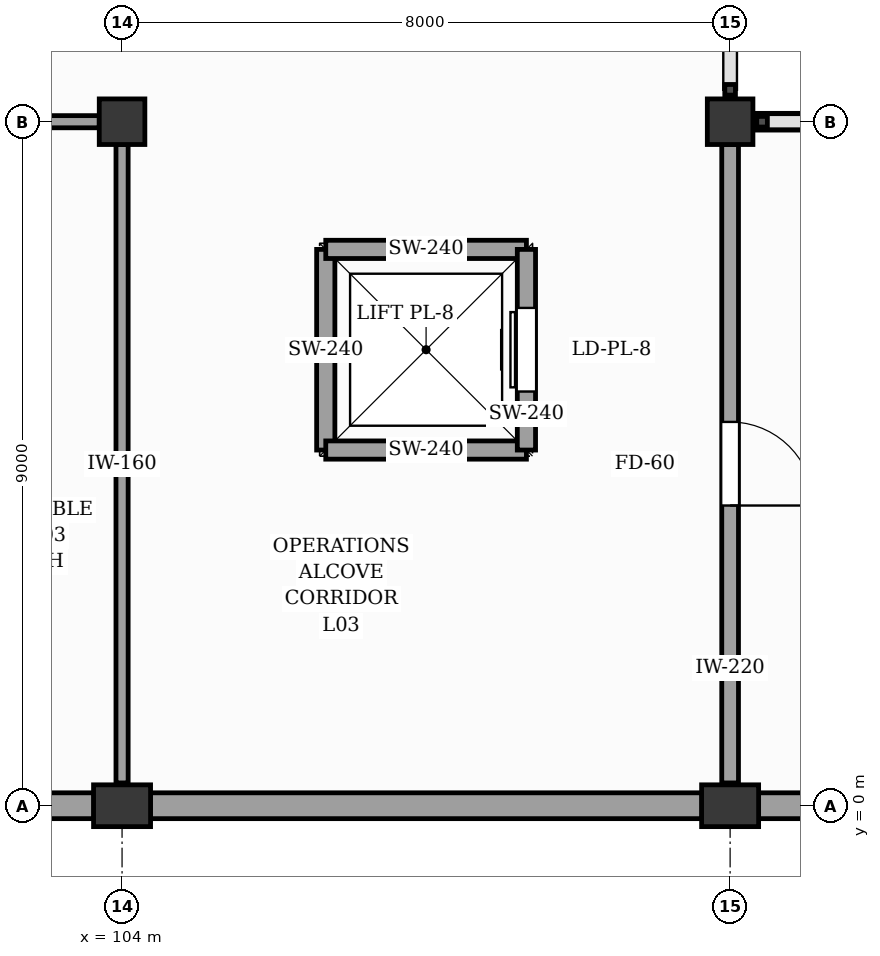
"""IFC4 building model, lengths in metres.
Left out: names, types, materials, properties, quantities, classifications, styles, units other than length and angle.
Written with IfcOpenShell. Run it as: python <this file> out.ifc"""

import sys

from ifc_helpers import new_model, si_unit, direction, frame, frame_2d, origin, origin_2d, place, context, subcontext, project, spatial, rectangle, extrude, element, fill, save


model = new_model("IFC4")
c1 = context("Model", 3, precision=1e-05, world=origin(), true_north=direction((0.0, 1.0)))
c2 = subcontext(c1, "Body", "Model", "MODEL_VIEW")
j1 = project(units=[si_unit("LENGTHUNIT", "METRE"), si_unit("PLANEANGLEUNIT", "RADIAN")], contexts=[c1])
p1 = place(None, origin())
s1 = spatial("IfcSite", under=j1, at=p1, CompositionType="ELEMENT")
p2 = place(p1, origin())
s2 = spatial("IfcBuilding", under=s1, at=p2, CompositionType="ELEMENT")
p3 = place(p2, frame((0.0, 0.0, 16.2)))
s3 = spatial("IfcBuildingStorey", under=s2, at=p3, CompositionType="ELEMENT", Elevation=16.2)
p4 = place(p3, frame((104.0, 0.0, 0.0), z_axis=(0.0, 0.0, 1.0), x_axis=(1.0, 0.0, 0.0)))
e1 = element("IfcColumn", 1, at=p4, inside=s3, PredefinedType="PILASTER", context=c2, shape_type="SweptSolid", body=[
    extrude(rectangle(XDim=0.75, YDim=0.55, at=origin_2d()), origin(), (0.0, 0.0, 1.0), 4.2),
])
p5 = place(p3, frame((104.0, 9.0, 0.0), z_axis=(0.0, 0.0, 1.0), x_axis=(1.0, 0.0, 0.0)))
e2 = element("IfcColumn", 2, at=p5, inside=s3, PredefinedType="COLUMN", context=c2, shape_type="SweptSolid", body=[
    extrude(rectangle(XDim=0.6, YDim=0.6, at=origin_2d()), origin(), (0.0, 0.0, 1.0), 4.2),
])
p6 = place(p3, frame((112.0, 0.0, 0.0), z_axis=(0.0, 0.0, 1.0), x_axis=(1.0, 0.0, 0.0)))
e3 = element("IfcColumn", 3, at=p6, inside=s3, PredefinedType="PILASTER", context=c2, shape_type="SweptSolid", body=[
    extrude(rectangle(XDim=0.75, YDim=0.55, at=origin_2d()), origin(), (0.0, 0.0, 1.0), 4.2),
])
p7 = place(p3, frame((112.0, 9.0, 0.0), z_axis=(0.0, 0.0, 1.0), x_axis=(1.0, 0.0, 0.0)))
e4 = element("IfcColumn", 4, at=p7, inside=s3, PredefinedType="COLUMN", context=c2, shape_type="SweptSolid", body=[
    extrude(rectangle(XDim=0.6, YDim=0.6, at=origin_2d()), origin(), (0.0, 0.0, 1.0), 4.2),
])
for number, where, z_axis, x_axis in (
    (5, (96.37, 0.0, 0.0), (0.0, 0.0, 1.0), (1.0, 0.0, 0.0)),
    (6, (104.37, 0.0, 0.0), (0.0, 0.0, 1.0), (1.0, 0.0, 0.0)),
):
    element("IfcWall", number, at=place(p3, frame(where, z_axis=z_axis, x_axis=x_axis)), inside=s3, PredefinedType="SOLIDWALL", context=c2, shape_type="SweptSolid", body=[
        extrude(rectangle(XDim=7.26, YDim=0.34, at=frame_2d((3.63, 0.0))), origin(), (0.0, 0.0, 1.0), 3.24),
    ])
p8 = place(p3, frame((112.37, 0.0, 0.0), z_axis=(0.0, 0.0, 1.0), x_axis=(1.0, 0.0, 0.0)))
e7 = element("IfcWall", 7, at=p8, inside=s3, PredefinedType="SOLIDWALL", context=c2, shape_type="SweptSolid", body=[
    extrude(rectangle(XDim=7.26, YDim=0.34, at=frame_2d((3.63, 0.0))), origin(), (0.0, 0.0, 1.0), 2.75),
])
for number, where, z_axis, x_axis in (
    (8, (106.68, 4.68, 0.0), (0.0, 0.0, 1.0), (0.0, 1.0, 0.0)),
    (9, (106.68, 4.68, 0.0), (0.0, 0.0, 1.0), (1.0, 0.0, 0.0)),
    (10, (106.68, 7.32, 0.0), (0.0, 0.0, 1.0), (1.0, 0.0, 0.0)),
):
    element("IfcWall", number, at=place(p3, frame(where, z_axis=z_axis, x_axis=x_axis)), inside=s3, PredefinedType="SHEAR", context=c2, shape_type="SweptSolid", body=[
        extrude(rectangle(XDim=2.64, YDim=0.24, at=frame_2d((1.32, 0.0))), origin(), (0.0, 0.0, 1.0), 3.92),
    ])
p9 = place(p3, frame((109.32, 4.68, 0.0), z_axis=(0.0, 0.0, 1.0), x_axis=(0.0, 1.0, 0.0)))
e11 = element("IfcWall", 11, at=p9, inside=s3, PredefinedType="SHEAR", context=c2, shape_type="SweptSolid", body=[
    extrude(rectangle(XDim=2.64, YDim=0.24, at=frame_2d((1.32, 0.0))), origin(), (0.0, 0.0, 1.0), 3.92),
])
p10 = place(p9, frame((0.77, 0.0, 0.0)))
e12 = element("IfcOpeningElement", 12, at=p10, cuts=e11, PredefinedType="OPENING", context=c2, shape_type="SweptSolid", body=[
    extrude(rectangle(XDim=1.1, YDim=2.15, at=frame_2d((0.55, 1.075))), frame((0.0, 0.13, 0.0), z_axis=(0.0, -1.0, 0.0), x_axis=(1.0, 0.0, 0.0)), (0.0, 0.0, 1.0), 0.26),
])
p11 = place(p3, frame((101.5, 9.0, 0.0), z_axis=(0.0, 0.0, 1.0), x_axis=(1.0, 0.0, 0.0)))
e13 = element("IfcWall", 13, at=p11, inside=s3, PredefinedType="PARTITIONING", context=c2, shape_type="SweptSolid", body=[
    extrude(rectangle(XDim=2.2, YDim=0.16, at=frame_2d((1.1, 0.0))), origin(), (0.0, 0.0, 1.0), 3.1),
])
p12 = place(p11, frame((0.2, 0.0, 0.0)))
e14 = element("IfcOpeningElement", 14, at=p12, cuts=e13, PredefinedType="OPENING", context=c2, shape_type="SweptSolid", body=[
    extrude(rectangle(XDim=1.05, YDim=2.1, at=frame_2d((0.525, 1.05))), frame((0.0, 0.09, 0.0), z_axis=(0.0, -1.0, 0.0), x_axis=(1.0, 0.0, 0.0)), (0.0, 0.0, 1.0), 0.18),
])
p13 = place(p3, frame((104.0, 0.3, 0.0), z_axis=(0.0, 0.0, 1.0), x_axis=(0.0, 1.0, 0.0)))
e15 = element("IfcWall", 15, at=p13, inside=s3, PredefinedType="PARTITIONING", context=c2, shape_type="SweptSolid", body=[
    extrude(rectangle(XDim=8.4, YDim=0.16, at=frame_2d((4.2, 0.0))), origin(), (0.0, 0.0, 1.0), 3.1),
])
p14 = place(p3, frame((112.3, 9.0, 0.0), z_axis=(0.0, 0.0, 1.0), x_axis=(1.0, 0.0, 0.0)))
e16 = element("IfcWall", 16, at=p14, inside=s3, PredefinedType="SOLIDWALL", context=c2, shape_type="SweptSolid", body=[
    extrude(rectangle(XDim=7.4, YDim=0.22, at=frame_2d((3.7, 0.0))), origin(), (0.0, 0.0, 1.0), 2.3),
])
p15 = place(p3, frame((112.0, 0.3, 0.0), z_axis=(0.0, 0.0, 1.0), x_axis=(0.0, 1.0, 0.0)))
e17 = element("IfcWall", 17, at=p15, inside=s3, PredefinedType="SOLIDWALL", context=c2, shape_type="SweptSolid", body=[
    extrude(rectangle(XDim=8.4, YDim=0.22, at=frame_2d((4.2, 0.0))), origin(), (0.0, 0.0, 1.0), 3.1),
])
p16 = place(p15, frame((3.65, 0.0, 0.0)))
e18 = element("IfcOpeningElement", 18, at=p16, cuts=e17, PredefinedType="OPENING", context=c2, shape_type="SweptSolid", body=[
    extrude(rectangle(XDim=1.1, YDim=2.15, at=frame_2d((0.55, 1.075))), frame((0.0, 0.12, 0.0), z_axis=(0.0, -1.0, 0.0), x_axis=(1.0, 0.0, 0.0)), (0.0, 0.0, 1.0), 0.24),
])
p17 = place(p10, origin())
e19 = element("IfcDoor", 19, at=p17, inside=s3, OperationType="DOUBLE_DOOR_SLIDING", PredefinedType="DOOR", context=c2, shape_type="SweptSolid", body=[
    extrude(rectangle(XDim=1.1, YDim=2.15, at=frame_2d((0.55, 1.075))), frame((0.0, 0.025, 0.0), z_axis=(0.0, -1.0, 0.0), x_axis=(1.0, 0.0, 0.0)), (0.0, 0.0, 1.0), 0.05),
])
fill(e12, e19)
p18 = place(p16, frame((1.1, 0.0, 0.0), z_axis=(0.0, 0.0, 1.0), x_axis=(-1.0, 0.0, 0.0)))
e20 = element("IfcDoor", 20, at=p18, inside=s3, OperationType="SINGLE_SWING_LEFT", PredefinedType="DOOR", context=c2, shape_type="SweptSolid", body=[
    extrude(rectangle(XDim=1.1, YDim=2.15, at=frame_2d((0.55, 1.075))), frame((0.0, 0.025, 0.0), z_axis=(0.0, -1.0, 0.0), x_axis=(1.0, 0.0, 0.0)), (0.0, 0.0, 1.0), 0.05),
])
fill(e18, e20)
save(model, sys.argv[1])
